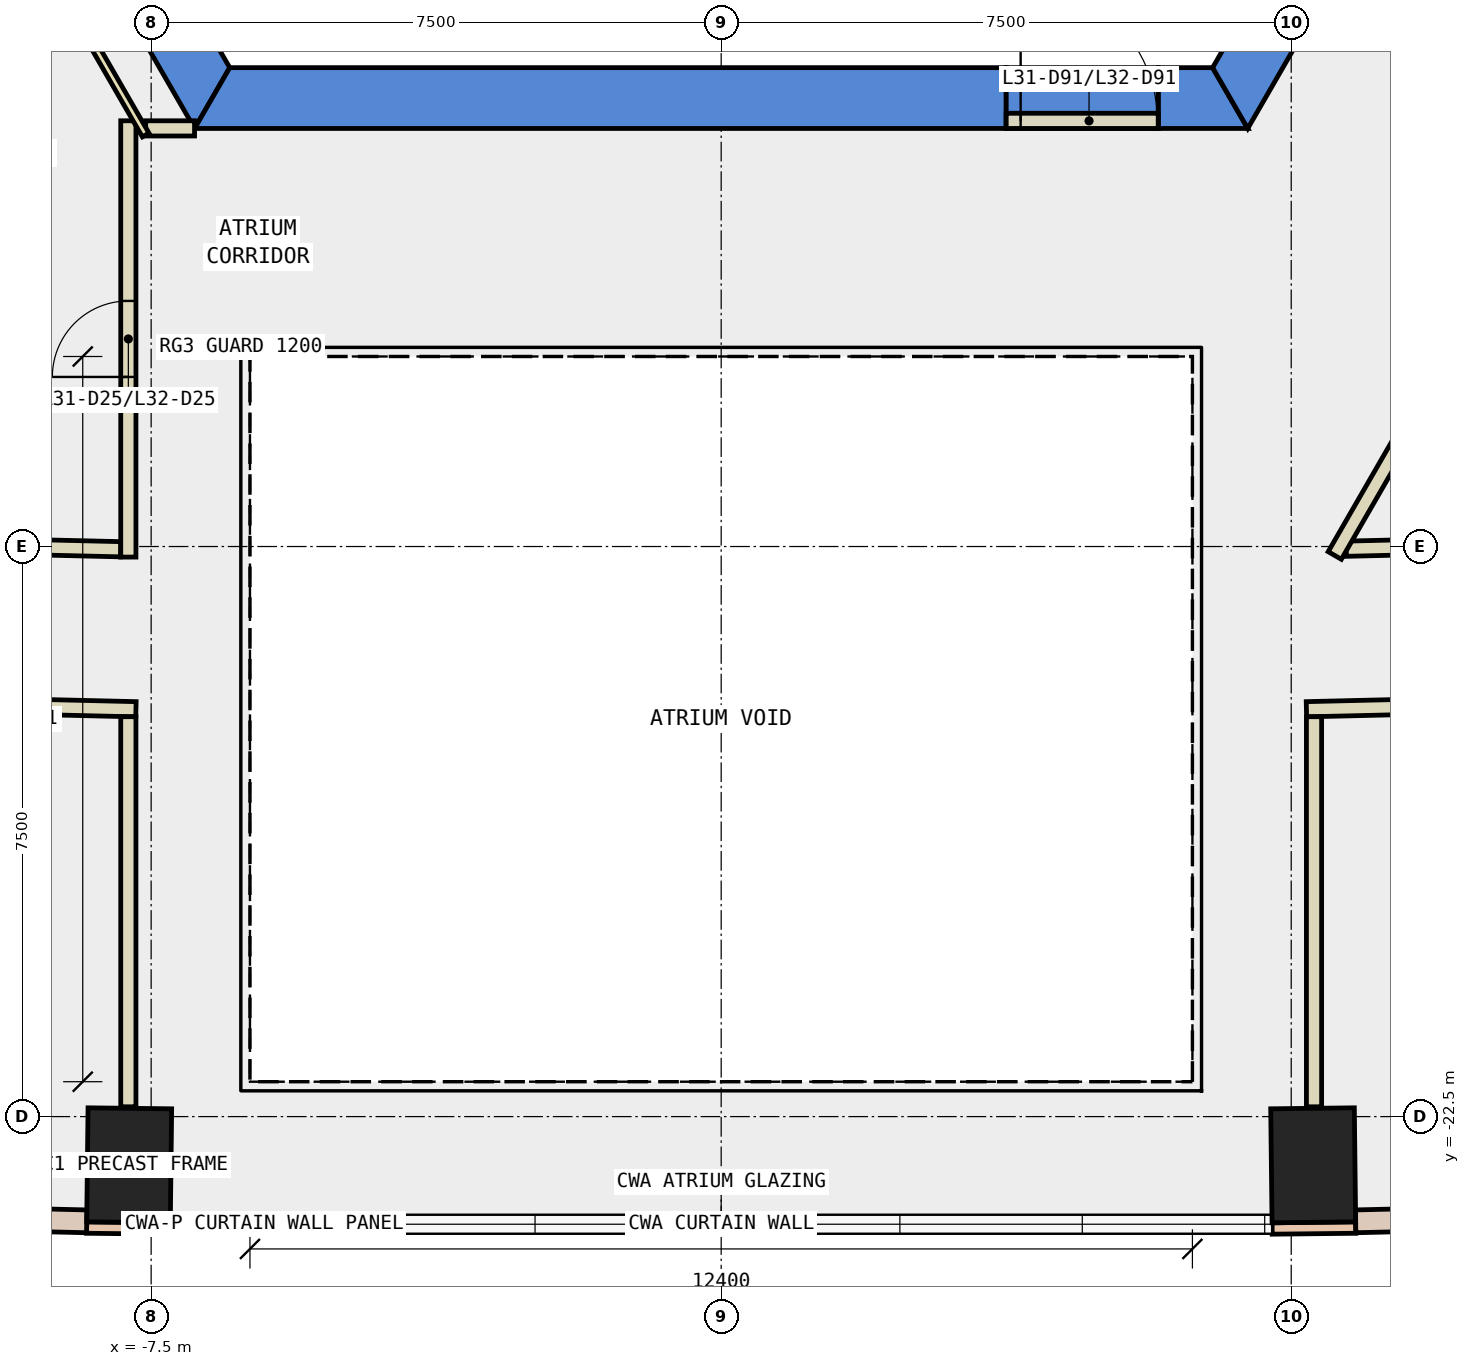
"""IFC4 building model, lengths in metres.
Left out: names, types, materials, properties, quantities, classifications, styles, units other than length and angle.
Written with IfcOpenShell. Run it as: python <this file> out.ifc"""

import sys

from ifc_helpers import new_model, si_unit, direction, frame, frame_2d, origin, origin_2d, place, context, subcontext, project, spatial, polyline, rectangle, outline, extrude, element, fill, save


model = new_model("IFC4")
c1 = context("Model", 3, precision=1e-05, world=origin(), true_north=direction((0.0, 1.0)))
c2 = subcontext(c1, "Body", "Model", "MODEL_VIEW")
j1 = project(units=[si_unit("LENGTHUNIT", "METRE"), si_unit("PLANEANGLEUNIT", "RADIAN")], contexts=[c1])
p1 = place(None, origin())
s1 = spatial("IfcSite", under=j1, at=p1, CompositionType="ELEMENT")
p2 = place(p1, origin())
s2 = spatial("IfcBuilding", under=s1, at=p2, CompositionType="ELEMENT")
p3 = place(p2, frame((0.0, 0.0, 142.4)))
s3 = spatial("IfcBuildingStorey", under=s2, at=p3, CompositionType="ELEMENT", Elevation=142.4)
for number, where, z_axis, x_axis in (
    (1, (-7.789, -23.141, -0.4), (0.0, 0.0, 1.0), (-1.0, 0.012, 0.0)),
    (2, (7.789, -23.141, -0.4), (0.0, 0.0, 1.0), (1.0, 0.012, 0.0)),
):
    element("IfcColumn", number, at=place(p3, frame(where, z_axis=z_axis, x_axis=x_axis)), inside=s3, PredefinedType="COLUMN", context=c2, shape_type="SweptSolid", body=[
        extrude(rectangle(XDim=1.1, YDim=1.5, at=origin_2d()), origin(), (0.0, 0.0, 1.0), 4.2),
    ])
p4 = place(p3, frame((0.0, 0.0, -0.4)))
e3 = element("IfcWall", 3, at=p4, inside=s3, PredefinedType="SHEAR", context=c2, shape_type="SweptSolid", body=[
    extrude(outline(polyline([(-13.856, 2.5), (-6.928, -9.5), (-6.466, -8.7), (-12.933, 2.5), (-13.856, 2.5)])), origin(), (0.0, 0.0, 1.0), 4.2),
])
p5 = place(p3, frame((0.0, 0.0, -0.4)))
e4 = element("IfcWall", 4, at=p5, inside=s3, PredefinedType="SHEAR", context=c2, shape_type="SweptSolid", body=[
    extrude(outline(polyline([(3.75, -9.5), (3.75, -8.7), (-6.466, -8.7), (-6.928, -9.5), (3.75, -9.5)])), origin(), (0.0, 0.0, 1.0), 4.2),
])
p6 = place(p3, frame((0.0, 0.0, -0.4)))
e5 = element("IfcWall", 5, at=p6, inside=s3, PredefinedType="SHEAR", context=c2, shape_type="SweptSolid", body=[
    extrude(outline(polyline([(5.75, -8.7), (5.75, -9.5), (6.928, -9.5), (6.466, -8.7), (5.75, -8.7)])), origin(), (0.0, 0.0, 1.0), 4.2),
])
p7 = place(p3, frame((0.0, 0.0, 3.6)))
e6 = element("IfcWall", 6, at=p7, inside=s3, PredefinedType="SHEAR", context=c2, shape_type="SweptSolid", body=[
    extrude(outline(polyline([(5.75, -9.5), (5.75, -8.7), (3.75, -8.7), (3.75, -9.5), (5.75, -9.5)])), origin(), (0.0, 0.0, 1.0), 0.2),
])
p8 = place(p3, frame((0.0, 0.0, -0.4)))
e7 = element("IfcWall", 7, at=p8, inside=s3, PredefinedType="SHEAR", context=c2, shape_type="SweptSolid", body=[
    extrude(outline(polyline([(8.117, -7.44), (7.424, -7.04), (6.466, -8.7), (6.928, -9.5), (8.117, -7.44)])), origin(), (0.0, 0.0, 1.0), 4.2),
])
for number, where, z_axis, x_axis in (
    (8, (-8.349, -23.96, 0.0), (0.0, 0.0, 1.0), (1.0, -0.011, 0.0)),
    (9, (7.249, -23.972, 0.0), (0.0, 0.0, 1.0), (1.0, 0.011, 0.0)),
):
    element("IfcWall", number, at=place(p3, frame(where, z_axis=z_axis, x_axis=x_axis)), inside=s3, PredefinedType="STANDARD", context=c2, shape_type="SweptSolid", body=[
        extrude(rectangle(XDim=1.1, YDim=0.15, at=frame_2d((0.55, 0.0))), origin(), (0.0, 0.0, 1.0), 3.8),
    ])
p9 = place(p3, frame((-15.68, -23.705, 0.0), z_axis=(0.0, 0.0, 1.0), x_axis=(0.999722302867, -0.023565168146, 0.0)))
e10 = element("IfcWall", 10, at=p9, inside=s3, PredefinedType="STANDARD", context=c2, shape_type="SweptSolid", body=[
    extrude(rectangle(XDim=7.335, YDim=0.3, at=frame_2d((3.667, 0.0))), origin(), (0.0, 0.0, 1.0), 3.8),
])
p10 = place(p9, frame((0.634, 0.0, 0.9)))
e11 = element("IfcOpeningElement", 11, at=p10, cuts=e10, PredefinedType="OPENING", context=c2, shape_type="SweptSolid", body=[
    extrude(rectangle(XDim=2.4, YDim=2.6, at=frame_2d((1.2, 1.3))), frame((0.0, 0.16, 0.0), z_axis=(0.0, -1.0, 0.0), x_axis=(1.0, 0.0, 0.0)), (0.0, 0.0, 1.0), 0.32),
])
p11 = place(p9, frame((4.301, 0.0, 0.9)))
e12 = element("IfcOpeningElement", 12, at=p11, cuts=e10, PredefinedType="OPENING", context=c2, shape_type="SweptSolid", body=[
    extrude(rectangle(XDim=2.4, YDim=2.6, at=frame_2d((1.2, 1.3))), frame((0.0, 0.16, 0.0), z_axis=(0.0, -1.0, 0.0), x_axis=(1.0, 0.0, 0.0)), (0.0, 0.0, 1.0), 0.32),
])
p12 = place(p3, frame((8.347, -23.878, 0.0), z_axis=(0.0, 0.0, 1.0), x_axis=(0.999722302867, 0.023565168146, 0.0)))
e13 = element("IfcWall", 13, at=p12, inside=s3, PredefinedType="STANDARD", context=c2, shape_type="SweptSolid", body=[
    extrude(rectangle(XDim=7.335, YDim=0.3, at=frame_2d((3.667, 0.0))), origin(), (0.0, 0.0, 1.0), 3.8),
])
p13 = place(p12, frame((0.634, 0.0, 0.9)))
e14 = element("IfcOpeningElement", 14, at=p13, cuts=e13, PredefinedType="OPENING", context=c2, shape_type="SweptSolid", body=[
    extrude(rectangle(XDim=2.4, YDim=2.6, at=frame_2d((1.2, 1.3))), frame((0.0, 0.16, 0.0), z_axis=(0.0, -1.0, 0.0), x_axis=(1.0, 0.0, 0.0)), (0.0, 0.0, 1.0), 0.32),
])
p14 = place(p12, frame((4.301, 0.0, 0.9)))
e15 = element("IfcOpeningElement", 15, at=p14, cuts=e13, PredefinedType="OPENING", context=c2, shape_type="SweptSolid", body=[
    extrude(rectangle(XDim=2.4, YDim=2.6, at=frame_2d((1.2, 1.3))), frame((0.0, 0.16, 0.0), z_axis=(0.0, -1.0, 0.0), x_axis=(1.0, 0.0, 0.0)), (0.0, 0.0, 1.0), 0.32),
])
p15 = place(p3, frame((8.223, -15.029, 0.0), z_axis=(0.0, 0.0, 1.0), x_axis=(0.99971920994, 0.023696018186, 0.0)))
e16 = element("IfcWall", 16, at=p15, inside=s3, PredefinedType="PARTITIONING", context=c2, shape_type="SweptSolid", body=[
    extrude(rectangle(XDim=7.727, YDim=0.2, at=frame_2d((3.864, 0.0))), origin(), (0.0, 0.0, 1.0), 3.8),
])
p16 = place(p3, frame((-10.155, -14.983, 0.0), z_axis=(0.0, 0.0, 1.0), x_axis=(0.999724165956, -0.023485995887, 0.0)))
e17 = element("IfcWall", 17, at=p16, inside=s3, PredefinedType="PARTITIONING", context=c2, shape_type="SweptSolid", body=[
    extrude(rectangle(XDim=2.256, YDim=0.2, at=frame_2d((1.128, 0.0))), origin(), (0.0, 0.0, 1.0), 3.8),
])
p17 = place(p3, frame((16.09, -16.943, 0.0), z_axis=(0.0, 0.0, 1.0), x_axis=(-0.999721662071, -0.023592337425, 0.0)))
e18 = element("IfcWall", 18, at=p17, inside=s3, PredefinedType="PARTITIONING", context=c2, shape_type="SweptSolid", body=[
    extrude(rectangle(XDim=8.393, YDim=0.2, at=frame_2d((4.196, 0.0))), origin(), (0.0, 0.0, 1.0), 3.8),
])
p18 = place(p17, frame((3.696, 0.0, 0.0)))
e19 = element("IfcOpeningElement", 19, at=p18, cuts=e18, PredefinedType="OPENING", context=c2, shape_type="SweptSolid", body=[
    extrude(rectangle(XDim=1.0, YDim=2.1, at=frame_2d((0.5, 1.05))), frame((0.0, 0.11, 0.0), z_axis=(0.0, -1.0, 0.0), x_axis=(1.0, 0.0, 0.0)), (0.0, 0.0, 1.0), 0.22),
])
p19 = place(p3, frame((-7.7, -17.141, 0.0), z_axis=(0.0, 0.0, 1.0), x_axis=(-0.999722699727, 0.023548325865, 0.0)))
e20 = element("IfcWall", 20, at=p19, inside=s3, PredefinedType="PARTITIONING", context=c2, shape_type="SweptSolid", body=[
    extrude(rectangle(XDim=8.242, YDim=0.2, at=frame_2d((4.121, 0.0))), origin(), (0.0, 0.0, 1.0), 3.8),
])
p20 = place(p19, frame((3.696, 0.0, 0.0)))
e21 = element("IfcOpeningElement", 21, at=p20, cuts=e20, PredefinedType="OPENING", context=c2, shape_type="SweptSolid", body=[
    extrude(rectangle(XDim=1.0, YDim=2.1, at=frame_2d((0.5, 1.05))), frame((0.0, 0.11, 0.0), z_axis=(0.0, -1.0, 0.0), x_axis=(1.0, 0.0, 0.0)), (0.0, 0.0, 1.0), 0.22),
])
p21 = place(p3, frame((-7.572, -9.499, 0.0), z_axis=(0.0, 0.0, 1.0), x_axis=(1.0, 0.0, 0.0)))
e22 = element("IfcWall", 22, at=p21, inside=s3, PredefinedType="PARTITIONING", context=c2, shape_type="SweptSolid", body=[
    extrude(rectangle(XDim=0.643, YDim=0.2, at=frame_2d((0.322, 0.0))), origin(), (0.0, 0.0, 1.0), 3.8),
])
p22 = place(p3, frame((-7.8, -15.139, 0.0), z_axis=(0.0, 0.0, 1.0), x_axis=(0.0, 1.0, 0.0)))
e23 = element("IfcWall", 23, at=p22, inside=s3, PredefinedType="PARTITIONING", context=c2, shape_type="SweptSolid", body=[
    extrude(rectangle(XDim=5.74, YDim=0.2, at=frame_2d((2.87, 0.0))), origin(), (0.0, 0.0, 1.0), 3.8),
])
p23 = place(p22, frame((2.37, 0.0, 0.0)))
e24 = element("IfcOpeningElement", 24, at=p23, cuts=e23, PredefinedType="OPENING", context=c2, shape_type="SweptSolid", body=[
    extrude(rectangle(XDim=1.0, YDim=2.1, at=frame_2d((0.5, 1.05))), frame((0.0, 0.11, 0.0), z_axis=(0.0, -1.0, 0.0), x_axis=(1.0, 0.0, 0.0)), (0.0, 0.0, 1.0), 0.22),
])
for number, where, z_axis, x_axis in (
    (25, (7.8, -17.239, 0.0), (0.0, 0.0, 1.0), (0.0, -1.0, 0.0)),
    (26, (-7.8, -22.371, 0.0), (0.0, 0.0, 1.0), (0.0, 1.0, 0.0)),
):
    element("IfcWall", number, at=place(p3, frame(where, z_axis=z_axis, x_axis=x_axis)), inside=s3, PredefinedType="PARTITIONING", context=c2, shape_type="SweptSolid", body=[
        extrude(rectangle(XDim=5.132, YDim=0.2, at=frame_2d((2.566, 0.0))), origin(), (0.0, 0.0, 1.0), 3.8),
    ])
p24 = place(p3, frame((-7.572, -9.586, 0.0), z_axis=(0.0, 0.0, 1.0), x_axis=(-0.500037407586, 0.866003805427, 0.0)))
e27 = element("IfcWall", 27, at=p24, inside=s3, PredefinedType="PARTITIONING", context=c2, shape_type="SweptSolid", body=[
    extrude(rectangle(XDim=4.115, YDim=0.1, at=frame_2d((2.058, 0.0))), origin(), (0.0, 0.0, 1.0), 3.8),
])
p25 = place(p3, frame((3.75, -9.4, 0.0), z_axis=(0.0, 0.0, 1.0), x_axis=(1.0, 0.0, 0.0)))
e28 = element("IfcWall", 28, at=p25, inside=s3, PredefinedType="PARTITIONING", context=c2, shape_type="SweptSolid", body=[
    extrude(rectangle(XDim=2.0, YDim=0.2, at=frame_2d((1.0, 0.0))), origin(), (0.0, 0.0, 1.0), 2.4),
])
p26 = place(p25, frame((0.19, 0.0, 0.0)))
e29 = element("IfcOpeningElement", 29, at=p26, cuts=e28, PredefinedType="OPENING", context=c2, shape_type="SweptSolid", body=[
    extrude(rectangle(XDim=1.8, YDim=2.1, at=frame_2d((0.9, 1.05))), frame((0.0, 0.11, 0.0), z_axis=(0.0, -1.0, 0.0), x_axis=(1.0, 0.0, 0.0)), (0.0, 0.0, 1.0), 0.22),
])
p27 = place(p3, frame((12.401, -7.621, 0.0), z_axis=(0.0, 0.0, 1.0), x_axis=(-0.499964151829, -0.866046099747, 0.0)))
e30 = element("IfcWall", 30, at=p27, inside=s3, PredefinedType="PARTITIONING", context=c2, shape_type="SweptSolid", body=[
    extrude(rectangle(XDim=8.656, YDim=0.2, at=frame_2d((4.328, 0.0))), origin(), (0.0, 0.0, 1.0), 3.8),
])
p28 = place(p27, frame((2.694, 0.0, 0.0)))
e31 = element("IfcOpeningElement", 31, at=p28, cuts=e30, PredefinedType="OPENING", context=c2, shape_type="SweptSolid", body=[
    extrude(rectangle(XDim=1.0, YDim=2.1, at=frame_2d((0.5, 1.05))), frame((0.0, 0.11, 0.0), z_axis=(0.0, -1.0, 0.0), x_axis=(1.0, 0.0, 0.0)), (0.0, 0.0, 1.0), 0.22),
])
p29 = place(p27, frame((3.794, 0.0, 0.0)))
e32 = element("IfcOpeningElement", 32, at=p29, cuts=e30, PredefinedType="OPENING", context=c2, shape_type="SweptSolid", body=[
    extrude(rectangle(XDim=1.0, YDim=2.1, at=frame_2d((0.5, 1.05))), frame((0.0, 0.11, 0.0), z_axis=(0.0, -1.0, 0.0), x_axis=(1.0, 0.0, 0.0)), (0.0, 0.0, 1.0), 0.22),
])
p30 = place(p23, origin())
e33 = element("IfcDoor", 33, at=p30, inside=s3, OperationType="SINGLE_SWING_LEFT", PredefinedType="DOOR", context=c2, shape_type="SweptSolid", body=[
    extrude(rectangle(XDim=1.0, YDim=2.1, at=frame_2d((0.5, 1.05))), frame((0.0, 0.025, 0.0), z_axis=(0.0, -1.0, 0.0), x_axis=(1.0, 0.0, 0.0)), (0.0, 0.0, 1.0), 0.05),
])
fill(e24, e33)
p31 = place(p26, origin())
e34 = element("IfcDoor", 34, at=p31, inside=s3, OperationType="DOUBLE_DOOR_SINGLE_SWING", PredefinedType="DOOR", context=c2, shape_type="SweptSolid", body=[
    extrude(rectangle(XDim=1.8, YDim=2.1, at=frame_2d((0.9, 1.05))), frame((0.0, 0.025, 0.0), z_axis=(0.0, -1.0, 0.0), x_axis=(1.0, 0.0, 0.0)), (0.0, 0.0, 1.0), 0.05),
])
fill(e29, e34)
save(model, sys.argv[1])
